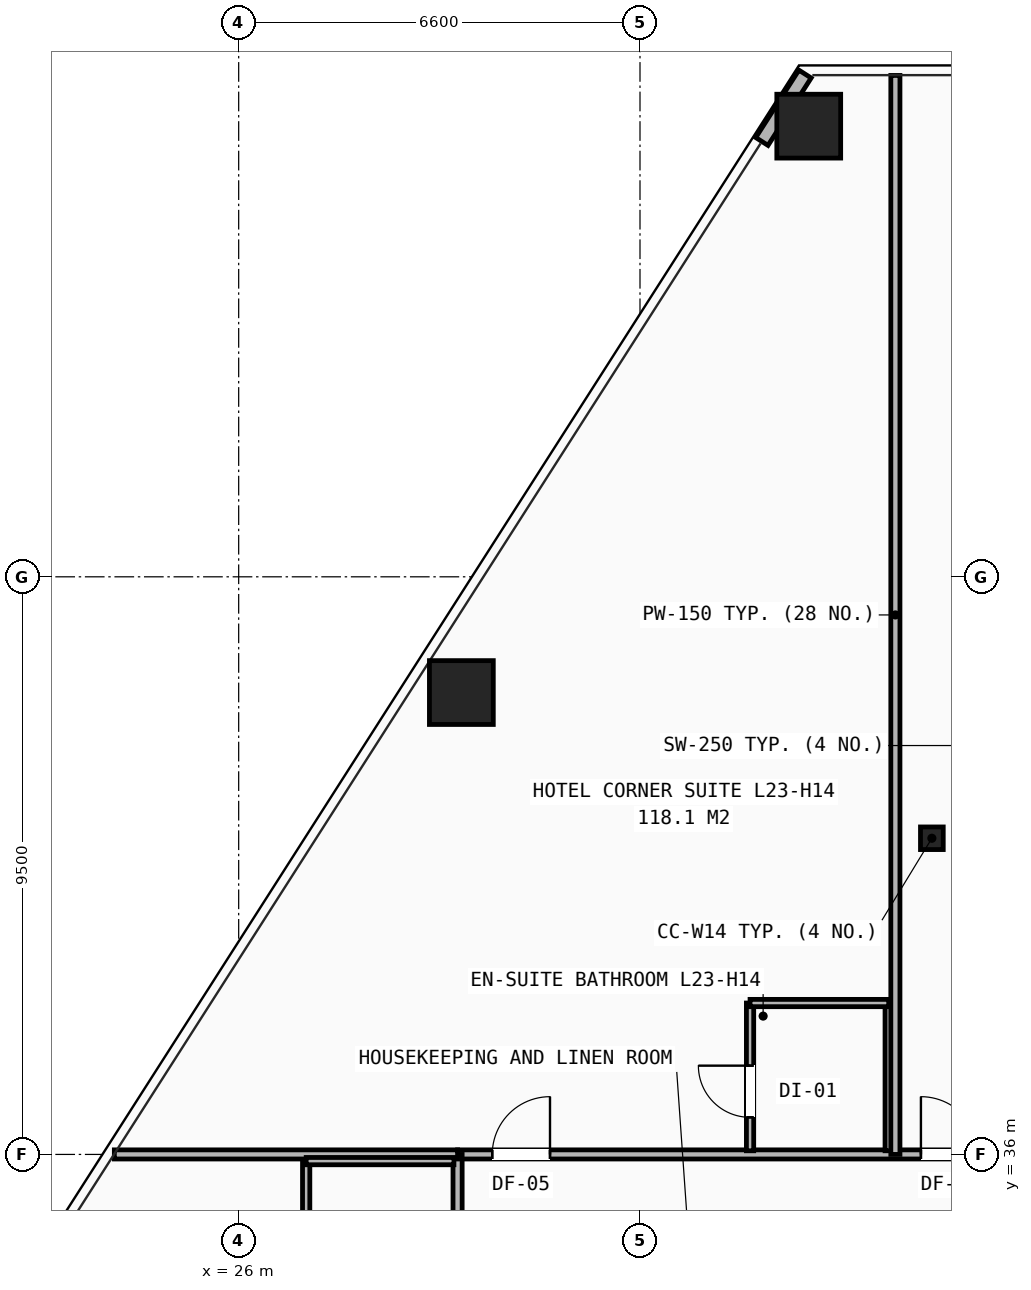
"""IFC4 building model, lengths in metres.
Left out: names, types, materials, properties, quantities, classifications, styles, units other than length and angle.
Written with IfcOpenShell. Run it as: python <this file> out.ifc"""

import sys

from ifc_helpers import new_model, si_unit, direction, frame, frame_2d, origin, origin_2d, place, context, subcontext, project, spatial, rectangle, hollow_rectangle, i_section, extrude, element, fill, save


model = new_model("IFC4")
c1 = context("Model", 3, precision=1e-05, world=origin(), true_north=direction((0.0, 1.0)))
c2 = subcontext(c1, "Body", "Model", "MODEL_VIEW")
j1 = project(units=[si_unit("LENGTHUNIT", "METRE"), si_unit("PLANEANGLEUNIT", "RADIAN")], contexts=[c1])
p1 = place(None, origin())
s1 = spatial("IfcSite", under=j1, at=p1, CompositionType="ELEMENT")
p2 = place(p1, origin())
s2 = spatial("IfcBuilding", under=s1, at=p2, CompositionType="ELEMENT")
p3 = place(p2, frame((0.0, 0.0, 83.0)))
s3 = spatial("IfcBuildingStorey", under=s2, at=p3, CompositionType="ELEMENT", Elevation=83.0)
p4 = place(p3, frame((37.4, 41.2, 0.0), z_axis=(0.0, 0.0, 1.0), x_axis=(1.0, 0.0, 0.0)))
e1 = element("IfcColumn", 1, at=p4, inside=s3, PredefinedType="COLUMN", context=c2, shape_type="SweptSolid", body=[
    extrude(i_section(OverallWidth=0.374, OverallDepth=0.372, WebThickness=0.016, FlangeThickness=0.026, at=origin_2d()), origin(), (0.0, 0.0, 1.0), 3.2),
])
for number, where, z_axis, x_axis in (
    (2, (35.375, 52.912, 0.0), (0.0, 0.0, 1.0), (1.0, 0.0, 0.0)),
    (3, (29.662, 43.596, 0.0), (0.0, 0.0, 1.0), (1.0, 0.0, 0.0)),
):
    element("IfcColumn", number, at=place(p3, frame(where, z_axis=z_axis, x_axis=x_axis)), inside=s3, PredefinedType="COLUMN", context=c2, shape_type="SweptSolid", body=[
        extrude(hollow_rectangle(XDim=1.05, YDim=1.05, WallThickness=0.07, at=origin_2d()), origin(), (0.0, 0.0, 1.0), 3.2),
    ])
p5 = place(p3, frame((35.314, 53.769, 0.0), z_axis=(0.0, 0.0, 1.0), x_axis=(-0.538937912301, -0.842345491283, 0.0)))
e4 = element("IfcWall", 4, at=p5, inside=s3, PredefinedType="SHEAR", context=c2, shape_type="SweptSolid", body=[
    extrude(rectangle(XDim=1.316, YDim=0.24, at=frame_2d((0.658, 0.0))), origin(), (0.0, 0.0, 1.0), 2.253),
])
p6 = place(p3, frame((29.6, 36.0, 0.0), z_axis=(0.0, 0.0, 1.0), x_axis=(1.0, 0.0, 0.0)))
e5 = element("IfcWall", 5, at=p6, inside=s3, PredefinedType="PARTITIONING", context=c2, shape_type="SweptSolid", body=[
    extrude(rectangle(XDim=9.65, YDim=0.15, at=frame_2d((4.825, 0.0))), origin(), (0.0, 0.0, 1.0), 2.503),
])
p7 = place(p6, frame((0.57, 0.0, 0.0)))
e6 = element("IfcOpeningElement", 6, at=p7, cuts=e5, PredefinedType="OPENING", context=c2, shape_type="SweptSolid", body=[
    extrude(rectangle(XDim=0.95, YDim=2.1, at=frame_2d((0.475, 1.05))), frame((0.0, 0.085, 0.0), z_axis=(0.0, -1.0, 0.0), x_axis=(1.0, 0.0, 0.0)), (0.0, 0.0, 1.0), 0.17),
])
p8 = place(p6, frame((7.62, 0.0, 0.0)))
e7 = element("IfcOpeningElement", 7, at=p8, cuts=e5, PredefinedType="OPENING", context=c2, shape_type="SweptSolid", body=[
    extrude(rectangle(XDim=0.95, YDim=2.1, at=frame_2d((0.475, 1.05))), frame((0.0, 0.085, 0.0), z_axis=(0.0, -1.0, 0.0), x_axis=(1.0, 0.0, 0.0)), (0.0, 0.0, 1.0), 0.17),
])
p9 = place(p3, frame((29.6, 14.1, 0.0), z_axis=(0.0, 0.0, 1.0), x_axis=(0.0, 1.0, 0.0)))
e8 = element("IfcWall", 8, at=p9, inside=s3, PredefinedType="PARTITIONING", context=c2, shape_type="SweptSolid", body=[
    extrude(rectangle(XDim=21.9, YDim=0.15, at=frame_2d((10.95, 0.0))), origin(), (0.0, 0.0, 1.0), 2.421),
])
p10 = place(p9, frame((0.42, 0.0, 0.0)))
e9 = element("IfcOpeningElement", 9, at=p10, cuts=e8, PredefinedType="OPENING", context=c2, shape_type="SweptSolid", body=[
    extrude(rectangle(XDim=0.95, YDim=2.1, at=frame_2d((0.475, 1.05))), frame((0.0, 0.085, 0.0), z_axis=(0.0, -1.0, 0.0), x_axis=(1.0, 0.0, 0.0)), (0.0, 0.0, 1.0), 0.17),
])
p11 = place(p9, frame((5.52, 0.0, 0.0)))
e10 = element("IfcOpeningElement", 10, at=p11, cuts=e8, PredefinedType="OPENING", context=c2, shape_type="SweptSolid", body=[
    extrude(rectangle(XDim=0.95, YDim=2.1, at=frame_2d((0.475, 1.05))), frame((0.0, 0.085, 0.0), z_axis=(0.0, -1.0, 0.0), x_axis=(1.0, 0.0, 0.0)), (0.0, 0.0, 1.0), 0.17),
])
p12 = place(p9, frame((10.92, 0.0, 0.0)))
e11 = element("IfcOpeningElement", 11, at=p12, cuts=e8, PredefinedType="OPENING", context=c2, shape_type="SweptSolid", body=[
    extrude(rectangle(XDim=0.95, YDim=2.1, at=frame_2d((0.475, 1.05))), frame((0.0, 0.085, 0.0), z_axis=(0.0, -1.0, 0.0), x_axis=(1.0, 0.0, 0.0)), (0.0, 0.0, 1.0), 0.17),
])
p13 = place(p9, frame((16.52, 0.0, 0.0)))
e12 = element("IfcOpeningElement", 12, at=p13, cuts=e8, PredefinedType="OPENING", context=c2, shape_type="SweptSolid", body=[
    extrude(rectangle(XDim=0.95, YDim=2.1, at=frame_2d((0.475, 1.05))), frame((0.0, 0.085, 0.0), z_axis=(0.0, -1.0, 0.0), x_axis=(1.0, 0.0, 0.0)), (0.0, 0.0, 1.0), 0.17),
])
p14 = place(p3, frame((23.955, 36.0, 0.0), z_axis=(0.0, 0.0, 1.0), x_axis=(1.0, 0.0, 0.0)))
e13 = element("IfcWall", 13, at=p14, inside=s3, PredefinedType="PARTITIONING", context=c2, shape_type="SweptSolid", body=[
    extrude(rectangle(XDim=5.645, YDim=0.15, at=frame_2d((2.823, 0.0))), origin(), (0.0, 0.0, 1.0), 2.258),
])
p15 = place(p3, frame((27.11, 33.61, 0.0), z_axis=(0.0, 0.0, 1.0), x_axis=(0.0, 1.0, 0.0)))
e14 = element("IfcWall", 14, at=p15, inside=s3, PredefinedType="PARTITIONING", context=c2, shape_type="SweptSolid", body=[
    extrude(rectangle(XDim=2.28, YDim=0.12, at=frame_2d((1.14, 0.0))), origin(), (0.0, 0.0, 1.0), 2.97),
])
p16 = place(p3, frame((27.11, 35.89, 0.0), z_axis=(0.0, 0.0, 1.0), x_axis=(1.0, 0.0, 0.0)))
e15 = element("IfcWall", 15, at=p16, inside=s3, PredefinedType="PARTITIONING", context=c2, shape_type="SweptSolid", body=[
    extrude(rectangle(XDim=2.43, YDim=0.12, at=frame_2d((1.215, 0.0))), origin(), (0.0, 0.0, 1.0), 2.503),
])
p17 = place(p3, frame((34.41, 36.06, 0.0), z_axis=(0.0, 0.0, 1.0), x_axis=(0.0, 1.0, 0.0)))
e16 = element("IfcWall", 16, at=p17, inside=s3, PredefinedType="PARTITIONING", context=c2, shape_type="SweptSolid", body=[
    extrude(rectangle(XDim=2.43, YDim=0.12, at=frame_2d((1.215, 0.0))), origin(), (0.0, 0.0, 1.0), 2.97),
])
p18 = place(p17, frame((0.55, 0.0, 0.0)))
e17 = element("IfcOpeningElement", 17, at=p18, cuts=e16, PredefinedType="OPENING", context=c2, shape_type="SweptSolid", body=[
    extrude(rectangle(XDim=0.85, YDim=2.05, at=frame_2d((0.425, 1.025))), frame((0.0, 0.07, 0.0), z_axis=(0.0, -1.0, 0.0), x_axis=(1.0, 0.0, 0.0)), (0.0, 0.0, 1.0), 0.14),
])
p19 = place(p3, frame((36.69, 36.06, 0.0), z_axis=(0.0, 0.0, 1.0), x_axis=(0.0, 1.0, 0.0)))
e18 = element("IfcWall", 18, at=p19, inside=s3, PredefinedType="PARTITIONING", context=c2, shape_type="SweptSolid", body=[
    extrude(rectangle(XDim=2.43, YDim=0.12, at=frame_2d((1.215, 0.0))), origin(), (0.0, 0.0, 1.0), 2.97),
])
p20 = place(p3, frame((34.41, 38.49, 0.0), z_axis=(0.0, 0.0, 1.0), x_axis=(1.0, 0.0, 0.0)))
e19 = element("IfcWall", 19, at=p20, inside=s3, PredefinedType="PARTITIONING", context=c2, shape_type="SweptSolid", body=[
    extrude(rectangle(XDim=2.28, YDim=0.12, at=frame_2d((1.14, 0.0))), origin(), (0.0, 0.0, 1.0), 2.97),
])
p21 = place(p3, frame((36.8, 36.0, 0.0), z_axis=(0.0, 0.0, 1.0), x_axis=(0.0, 1.0, 0.0)))
e20 = element("IfcWall", 20, at=p21, inside=s3, PredefinedType="PARTITIONING", context=c2, shape_type="SweptSolid", body=[
    extrude(rectangle(XDim=17.746, YDim=0.15, at=frame_2d((8.873, 0.0))), origin(), (0.0, 0.0, 1.0), 2.258),
])
p22 = place(p7, origin())
e21 = element("IfcDoor", 21, at=p22, inside=s3, OperationType="SINGLE_SWING_RIGHT", PredefinedType="DOOR", context=c2, shape_type="SweptSolid", body=[
    extrude(rectangle(XDim=0.95, YDim=2.1, at=frame_2d((0.475, 1.05))), frame((0.0, 0.025, 0.0), z_axis=(0.0, -1.0, 0.0), x_axis=(1.0, 0.0, 0.0)), (0.0, 0.0, 1.0), 0.05),
])
fill(e6, e21)
p23 = place(p18, origin())
e22 = element("IfcDoor", 22, at=p23, inside=s3, OperationType="SINGLE_SWING_RIGHT", PredefinedType="DOOR", context=c2, shape_type="SweptSolid", body=[
    extrude(rectangle(XDim=0.85, YDim=2.05, at=frame_2d((0.425, 1.025))), frame((0.0, 0.025, 0.0), z_axis=(0.0, -1.0, 0.0), x_axis=(1.0, 0.0, 0.0)), (0.0, 0.0, 1.0), 0.05),
])
fill(e17, e22)
p24 = place(p8, origin())
e23 = element("IfcDoor", 23, at=p24, inside=s3, OperationType="SINGLE_SWING_LEFT", PredefinedType="DOOR", context=c2, shape_type="SweptSolid", body=[
    extrude(rectangle(XDim=0.95, YDim=2.1, at=frame_2d((0.475, 1.05))), frame((0.0, 0.025, 0.0), z_axis=(0.0, -1.0, 0.0), x_axis=(1.0, 0.0, 0.0)), (0.0, 0.0, 1.0), 0.05),
])
fill(e7, e23)
save(model, sys.argv[1])
